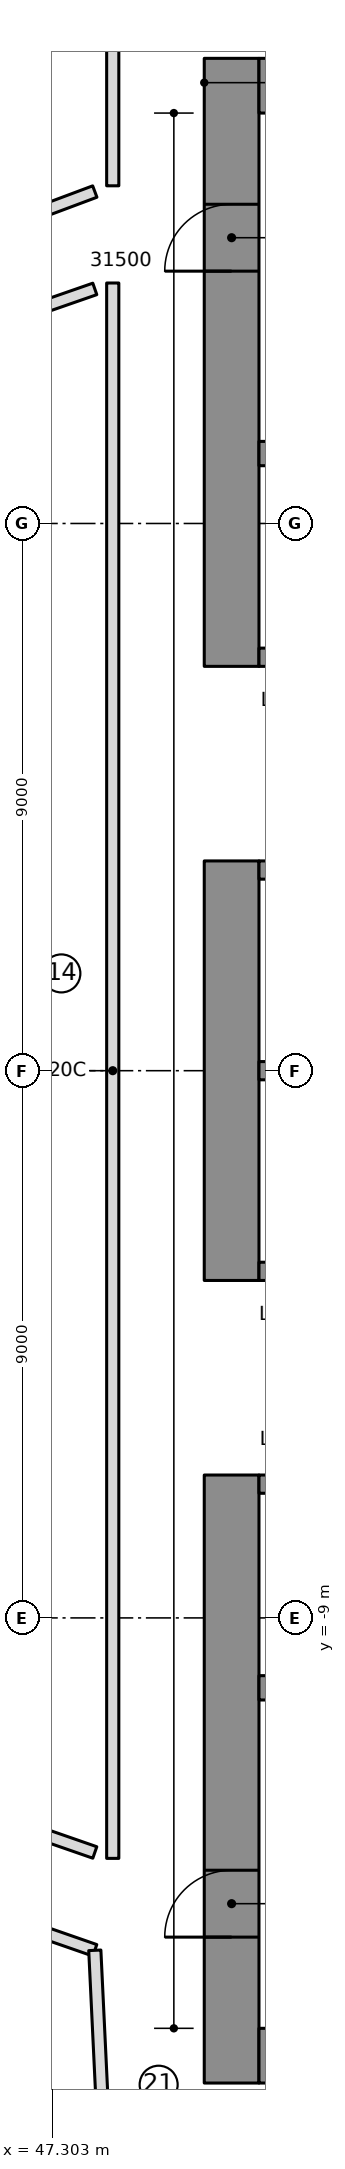
"""IFC4 building model, lengths in metres.
Left out: names, types, materials, properties, quantities, classifications, styles, units other than length and angle.
Written with IfcOpenShell. Run it as: python <this file> out.ifc"""

import sys

from ifc_helpers import new_model, si_unit, direction, frame, frame_2d, origin, place, context, subcontext, project, spatial, rectangle, extrude, element, fill, save


model = new_model("IFC4")
c1 = context("Model", 3, precision=1e-05, world=origin(), true_north=direction((0.0, 1.0)))
c2 = subcontext(c1, "Body", "Model", "MODEL_VIEW")
j1 = project(units=[si_unit("LENGTHUNIT", "METRE"), si_unit("PLANEANGLEUNIT", "RADIAN")], contexts=[c1])
p1 = place(None, origin())
s1 = spatial("IfcSite", under=j1, at=p1, CompositionType="ELEMENT")
p2 = place(p1, origin())
s2 = spatial("IfcBuilding", under=s1, at=p2, CompositionType="ELEMENT")
p3 = place(p2, frame((0.0, 0.0, 133.75)))
s3 = spatial("IfcBuildingStorey", under=s2, at=p3, CompositionType="ELEMENT", Elevation=133.75)
p4 = place(p3, frame((50.25, 6.65, 0.0), z_axis=(0.0, 0.0, 1.0), x_axis=(0.0, 1.0, 0.0)))
e1 = element("IfcWall", 1, at=p4, inside=s3, PredefinedType="SHEAR", context=c2, shape_type="SweptSolid", body=[
    extrude(rectangle(XDim=10.0, YDim=0.9, at=frame_2d((5.0, 0.0))), origin(), (0.0, 0.0, 1.0), 3.55),
])
p5 = place(p4, frame((6.5, 0.0, 0.0)))
e2 = element("IfcOpeningElement", 2, at=p5, cuts=e1, PredefinedType="OPENING", context=c2, shape_type="SweptSolid", body=[
    extrude(rectangle(XDim=1.1, YDim=2.1, at=frame_2d((0.55, 1.05))), frame((0.0, 0.46, 0.0), z_axis=(0.0, -1.0, 0.0), x_axis=(1.0, 0.0, 0.0)), (0.0, 0.0, 1.0), 0.92),
])
p6 = place(p3, frame((50.25, -3.45, 0.0), z_axis=(0.0, 0.0, 1.0), x_axis=(0.0, 1.0, 0.0)))
e3 = element("IfcWall", 3, at=p6, inside=s3, PredefinedType="SHEAR", context=c2, shape_type="SweptSolid", body=[
    extrude(rectangle(XDim=6.9, YDim=0.9, at=frame_2d((3.45, 0.0))), origin(), (0.0, 0.0, 1.0), 3.55),
])
p7 = place(p3, frame((50.25, -16.65, 0.0), z_axis=(0.0, 0.0, 1.0), x_axis=(0.0, 1.0, 0.0)))
e4 = element("IfcWall", 4, at=p7, inside=s3, PredefinedType="SHEAR", context=c2, shape_type="SweptSolid", body=[
    extrude(rectangle(XDim=10.0, YDim=0.9, at=frame_2d((5.0, 0.0))), origin(), (0.0, 0.0, 1.0), 3.55),
])
p8 = place(p7, frame((2.4, 0.0, 0.0)))
e5 = element("IfcOpeningElement", 5, at=p8, cuts=e4, PredefinedType="OPENING", context=c2, shape_type="SweptSolid", body=[
    extrude(rectangle(XDim=1.1, YDim=2.1, at=frame_2d((0.55, 1.05))), frame((0.0, 0.46, 0.0), z_axis=(0.0, -1.0, 0.0), x_axis=(1.0, 0.0, 0.0)), (0.0, 0.0, 1.0), 0.92),
])
for number, where, z_axis, x_axis in (
    (6, (50.7, 16.2, 0.0), (0.0, 0.0, 1.0), (1.0, 0.0, 0.0)),
    (7, (50.7, -16.2, 0.0), (0.0, 0.0, 1.0), (1.0, 0.0, 0.0)),
):
    element("IfcWall", number, at=place(p3, frame(where, z_axis=z_axis, x_axis=x_axis)), inside=s3, PredefinedType="SHEAR", context=c2, shape_type="SweptSolid", body=[
        extrude(rectangle(XDim=13.92, YDim=0.9, at=frame_2d((6.96, 0.0))), origin(), (0.0, 0.0, 1.0), 3.55),
    ])
p9 = place(p3, frame((50.7, 10.15, 0.0), z_axis=(0.0, 0.0, 1.0), x_axis=(1.0, 0.0, 0.0)))
e8 = element("IfcWall", 8, at=p9, inside=s3, PredefinedType="SHEAR", context=c2, shape_type="SweptSolid", body=[
    extrude(rectangle(XDim=13.02, YDim=0.4, at=frame_2d((6.51, 0.0))), origin(), (0.0, 0.0, 1.0), 3.55),
])
p10 = place(p9, frame((0.7, 0.0, 0.0)))
e9 = element("IfcOpeningElement", 9, at=p10, cuts=e8, PredefinedType="OPENING", context=c2, shape_type="SweptSolid", body=[
    extrude(rectangle(XDim=1.1, YDim=2.1, at=frame_2d((0.55, 1.05))), frame((0.0, 0.21, 0.0), z_axis=(0.0, -1.0, 0.0), x_axis=(1.0, 0.0, 0.0)), (0.0, 0.0, 1.0), 0.42),
])
p11 = place(p9, frame((3.5, 0.0, 0.0)))
e10 = element("IfcOpeningElement", 10, at=p11, cuts=e8, PredefinedType="OPENING", context=c2, shape_type="SweptSolid", body=[
    extrude(rectangle(XDim=1.1, YDim=2.1, at=frame_2d((0.55, 1.05))), frame((0.0, 0.21, 0.0), z_axis=(0.0, -1.0, 0.0), x_axis=(1.0, 0.0, 0.0)), (0.0, 0.0, 1.0), 0.42),
])
p12 = place(p3, frame((50.7, -10.15, 0.0), z_axis=(0.0, 0.0, 1.0), x_axis=(1.0, 0.0, 0.0)))
e11 = element("IfcWall", 11, at=p12, inside=s3, PredefinedType="SHEAR", context=c2, shape_type="SweptSolid", body=[
    extrude(rectangle(XDim=13.02, YDim=0.4, at=frame_2d((6.51, 0.0))), origin(), (0.0, 0.0, 1.0), 3.55),
])
p13 = place(p3, frame((50.7, 0.0, 0.0), z_axis=(0.0, 0.0, 1.0), x_axis=(1.0, 0.0, 0.0)))
e12 = element("IfcWall", 12, at=p13, inside=s3, PredefinedType="SHEAR", context=c2, shape_type="SweptSolid", body=[
    extrude(rectangle(XDim=10.9, YDim=0.3, at=frame_2d((5.45, 0.0))), origin(), (0.0, 0.0, 1.0), 3.55),
])
p14 = place(p3, frame((50.7, 3.3, 0.0), z_axis=(0.0, 0.0, 1.0), x_axis=(1.0, 0.0, 0.0)))
e13 = element("IfcWall", 13, at=p14, inside=s3, PredefinedType="SHEAR", context=c2, shape_type="SweptSolid", body=[
    extrude(rectangle(XDim=10.9, YDim=0.3, at=frame_2d((5.45, 0.0))), origin(), (0.0, 0.0, 1.0), 3.55),
])
p15 = place(p14, frame((0.8, 0.0, 0.0)))
e14 = element("IfcOpeningElement", 14, at=p15, cuts=e13, PredefinedType="OPENING", context=c2, shape_type="SweptSolid", body=[
    extrude(rectangle(XDim=0.9, YDim=2.1, at=frame_2d((0.45, 1.05))), frame((0.0, 0.16, 0.0), z_axis=(0.0, -1.0, 0.0), x_axis=(1.0, 0.0, 0.0)), (0.0, 0.0, 1.0), 0.32),
])
p16 = place(p14, frame((3.6, 0.0, 0.0)))
e15 = element("IfcOpeningElement", 15, at=p16, cuts=e13, PredefinedType="OPENING", context=c2, shape_type="SweptSolid", body=[
    extrude(rectangle(XDim=0.9, YDim=2.1, at=frame_2d((0.45, 1.05))), frame((0.0, 0.16, 0.0), z_axis=(0.0, -1.0, 0.0), x_axis=(1.0, 0.0, 0.0)), (0.0, 0.0, 1.0), 0.32),
])
p17 = place(p14, frame((6.4, 0.0, 0.0)))
e16 = element("IfcOpeningElement", 16, at=p17, cuts=e13, PredefinedType="OPENING", context=c2, shape_type="SweptSolid", body=[
    extrude(rectangle(XDim=0.9, YDim=2.1, at=frame_2d((0.45, 1.05))), frame((0.0, 0.16, 0.0), z_axis=(0.0, -1.0, 0.0), x_axis=(1.0, 0.0, 0.0)), (0.0, 0.0, 1.0), 0.32),
])
p18 = place(p14, frame((9.2, 0.0, 0.0)))
e17 = element("IfcOpeningElement", 17, at=p18, cuts=e13, PredefinedType="OPENING", context=c2, shape_type="SweptSolid", body=[
    extrude(rectangle(XDim=0.9, YDim=2.1, at=frame_2d((0.45, 1.05))), frame((0.0, 0.16, 0.0), z_axis=(0.0, -1.0, 0.0), x_axis=(1.0, 0.0, 0.0)), (0.0, 0.0, 1.0), 0.32),
])
p19 = place(p3, frame((50.7, 6.8, 0.0), z_axis=(0.0, 0.0, 1.0), x_axis=(1.0, 0.0, 0.0)))
e18 = element("IfcWall", 18, at=p19, inside=s3, PredefinedType="SHEAR", context=c2, shape_type="SweptSolid", body=[
    extrude(rectangle(XDim=10.9, YDim=0.3, at=frame_2d((5.45, 0.0))), origin(), (0.0, 0.0, 1.0), 3.55),
])
p20 = place(p19, frame((6.3, 0.0, 0.0)))
e19 = element("IfcOpeningElement", 19, at=p20, cuts=e18, PredefinedType="OPENING", context=c2, shape_type="SweptSolid", body=[
    extrude(rectangle(XDim=1.1, YDim=2.1, at=frame_2d((0.55, 1.05))), frame((0.0, 0.16, 0.0), z_axis=(0.0, -1.0, 0.0), x_axis=(1.0, 0.0, 0.0)), (0.0, 0.0, 1.0), 0.32),
])
p21 = place(p19, frame((9.1, 0.0, 0.0)))
e20 = element("IfcOpeningElement", 20, at=p21, cuts=e18, PredefinedType="OPENING", context=c2, shape_type="SweptSolid", body=[
    extrude(rectangle(XDim=1.1, YDim=2.1, at=frame_2d((0.55, 1.05))), frame((0.0, 0.16, 0.0), z_axis=(0.0, -1.0, 0.0), x_axis=(1.0, 0.0, 0.0)), (0.0, 0.0, 1.0), 0.32),
])
p22 = place(p3, frame((50.7, -3.3, 0.0), z_axis=(0.0, 0.0, 1.0), x_axis=(1.0, 0.0, 0.0)))
e21 = element("IfcWall", 21, at=p22, inside=s3, PredefinedType="SHEAR", context=c2, shape_type="SweptSolid", body=[
    extrude(rectangle(XDim=10.9, YDim=0.3, at=frame_2d((5.45, 0.0))), origin(), (0.0, 0.0, 1.0), 3.55),
])
p23 = place(p22, frame((9.2, 0.0, 0.0)))
e22 = element("IfcOpeningElement", 22, at=p23, cuts=e21, PredefinedType="OPENING", context=c2, shape_type="SweptSolid", body=[
    extrude(rectangle(XDim=0.9, YDim=2.1, at=frame_2d((0.45, 1.05))), frame((0.0, 0.16, 0.0), z_axis=(0.0, -1.0, 0.0), x_axis=(1.0, 0.0, 0.0)), (0.0, 0.0, 1.0), 0.32),
])
p24 = place(p3, frame((50.7, -6.8, 0.0), z_axis=(0.0, 0.0, 1.0), x_axis=(1.0, 0.0, 0.0)))
e23 = element("IfcWall", 23, at=p24, inside=s3, PredefinedType="SHEAR", context=c2, shape_type="SweptSolid", body=[
    extrude(rectangle(XDim=10.9, YDim=0.3, at=frame_2d((5.45, 0.0))), origin(), (0.0, 0.0, 1.0), 3.55),
])
p25 = place(p24, frame((0.7, 0.0, 0.0)))
e24 = element("IfcOpeningElement", 24, at=p25, cuts=e23, PredefinedType="OPENING", context=c2, shape_type="SweptSolid", body=[
    extrude(rectangle(XDim=1.1, YDim=2.1, at=frame_2d((0.55, 1.05))), frame((0.0, 0.16, 0.0), z_axis=(0.0, -1.0, 0.0), x_axis=(1.0, 0.0, 0.0)), (0.0, 0.0, 1.0), 0.32),
])
p26 = place(p24, frame((3.5, 0.0, 0.0)))
e25 = element("IfcOpeningElement", 25, at=p26, cuts=e23, PredefinedType="OPENING", context=c2, shape_type="SweptSolid", body=[
    extrude(rectangle(XDim=1.1, YDim=2.1, at=frame_2d((0.55, 1.05))), frame((0.0, 0.16, 0.0), z_axis=(0.0, -1.0, 0.0), x_axis=(1.0, 0.0, 0.0)), (0.0, 0.0, 1.0), 0.32),
])
p27 = place(p24, frame((6.3, 0.0, 0.0)))
e26 = element("IfcOpeningElement", 26, at=p27, cuts=e23, PredefinedType="OPENING", context=c2, shape_type="SweptSolid", body=[
    extrude(rectangle(XDim=1.1, YDim=2.1, at=frame_2d((0.55, 1.05))), frame((0.0, 0.16, 0.0), z_axis=(0.0, -1.0, 0.0), x_axis=(1.0, 0.0, 0.0)), (0.0, 0.0, 1.0), 0.32),
])
p28 = place(p24, frame((9.1, 0.0, 0.0)))
e27 = element("IfcOpeningElement", 27, at=p28, cuts=e23, PredefinedType="OPENING", context=c2, shape_type="SweptSolid", body=[
    extrude(rectangle(XDim=1.1, YDim=2.1, at=frame_2d((0.55, 1.05))), frame((0.0, 0.16, 0.0), z_axis=(0.0, -1.0, 0.0), x_axis=(1.0, 0.0, 0.0)), (0.0, 0.0, 1.0), 0.32),
])
p29 = place(p3, frame((48.0, 14.459, 0.0), z_axis=(0.0, 0.0, 1.0), x_axis=(-0.936637096294, -0.350301227297, 0.0)))
e28 = element("IfcWall", 28, at=p29, inside=s3, PredefinedType="PARTITIONING", context=c2, shape_type="SweptSolid", body=[
    extrude(rectangle(XDim=9.796, YDim=0.2, at=frame_2d((4.898, 0.0))), origin(), (0.0, 0.0, 1.0), 3.25),
])
p30 = place(p29, frame((4.398, 0.0, 0.0)))
e29 = element("IfcOpeningElement", 29, at=p30, cuts=e28, PredefinedType="OPENING", context=c2, shape_type="SweptSolid", body=[
    extrude(rectangle(XDim=1.5, YDim=2.1, at=frame_2d((0.75, 1.05))), frame((0.0, 0.11, 0.0), z_axis=(0.0, -1.0, 0.0), x_axis=(1.0, 0.0, 0.0)), (0.0, 0.0, 1.0), 0.22),
])
p31 = place(p3, frame((47.012, -14.124, 0.0), z_axis=(0.0, 0.0, 1.0), x_axis=(0.944566081842, -0.32832136244, 0.0)))
e30 = element("IfcWall", 30, at=p31, inside=s3, PredefinedType="PARTITIONING", context=c2, shape_type="SweptSolid", body=[
    extrude(rectangle(XDim=1.045, YDim=0.2, at=frame_2d((0.523, 0.0))), origin(), (0.0, 0.0, 1.0), 3.25),
])
for number, where, z_axis, x_axis in (
    (31, (46.781, 12.434, 0.0), (0.0, 0.0, 1.0), (0.945, 0.328, 0.0)),
    (32, (48.0, -12.858, 0.0), (0.0, 0.0, 1.0), (-0.945, 0.328, 0.0)),
):
    element("IfcWall", number, at=place(p3, frame(where, z_axis=z_axis, x_axis=x_axis)), inside=s3, PredefinedType="PARTITIONING", context=c2, shape_type="SweptSolid", body=[
        extrude(rectangle(XDim=1.29, YDim=0.2, at=frame_2d((0.645, 0.0))), origin(), (0.0, 0.0, 1.0), 3.25),
    ])
p32 = place(p3, frame((48.0, -14.467, 0.0), z_axis=(0.0, 0.0, 1.0), x_axis=(0.047837808481, -0.998855116661, 0.0)))
e33 = element("IfcWall", 33, at=p32, inside=s3, PredefinedType="PARTITIONING", context=c2, shape_type="SweptSolid", body=[
    extrude(rectangle(XDim=5.828, YDim=0.2, at=frame_2d((2.914, 0.0))), origin(), (0.0, 0.0, 1.0), 3.25),
])
p33 = place(p32, frame((2.414, 0.0, 0.0)))
e34 = element("IfcOpeningElement", 34, at=p33, cuts=e33, PredefinedType="OPENING", context=c2, shape_type="SweptSolid", body=[
    extrude(rectangle(XDim=1.5, YDim=2.1, at=frame_2d((0.75, 1.05))), frame((0.0, 0.11, 0.0), z_axis=(0.0, -1.0, 0.0), x_axis=(1.0, 0.0, 0.0)), (0.0, 0.0, 1.0), 0.22),
])
p34 = place(p3, frame((48.295, 12.955, 0.0), z_axis=(0.0, 0.0, 1.0), x_axis=(0.0, -1.0, 0.0)))
e35 = element("IfcWall", 35, at=p34, inside=s3, PredefinedType="PARTITIONING", context=c2, shape_type="SweptSolid", body=[
    extrude(rectangle(XDim=25.91, YDim=0.2, at=frame_2d((12.955, 0.0))), origin(), (0.0, 0.0, 1.0), 3.25),
])
p35 = place(p3, frame((48.295, 20.501, 0.0), z_axis=(0.0, 0.0, 1.0), x_axis=(-4.1050903e-05, -0.999999999157, 0.0)))
e36 = element("IfcWall", 36, at=p35, inside=s3, PredefinedType="PARTITIONING", context=c2, shape_type="SweptSolid", body=[
    extrude(rectangle(XDim=5.947, YDim=0.2, at=frame_2d((2.974, 0.0))), origin(), (0.0, 0.0, 1.0), 3.25),
])
p36 = place(p5, origin())
e37 = element("IfcDoor", 37, at=p36, inside=s3, OperationType="SINGLE_SWING_RIGHT", PredefinedType="DOOR", context=c2, shape_type="SweptSolid", body=[
    extrude(rectangle(XDim=1.1, YDim=2.1, at=frame_2d((0.55, 1.05))), frame((0.0, 0.025, 0.0), z_axis=(0.0, -1.0, 0.0), x_axis=(1.0, 0.0, 0.0)), (0.0, 0.0, 1.0), 0.05),
])
fill(e2, e37)
p37 = place(p8, origin())
e38 = element("IfcDoor", 38, at=p37, inside=s3, OperationType="SINGLE_SWING_RIGHT", PredefinedType="DOOR", context=c2, shape_type="SweptSolid", body=[
    extrude(rectangle(XDim=1.1, YDim=2.1, at=frame_2d((0.55, 1.05))), frame((0.0, 0.025, 0.0), z_axis=(0.0, -1.0, 0.0), x_axis=(1.0, 0.0, 0.0)), (0.0, 0.0, 1.0), 0.05),
])
fill(e5, e38)
save(model, sys.argv[1])
